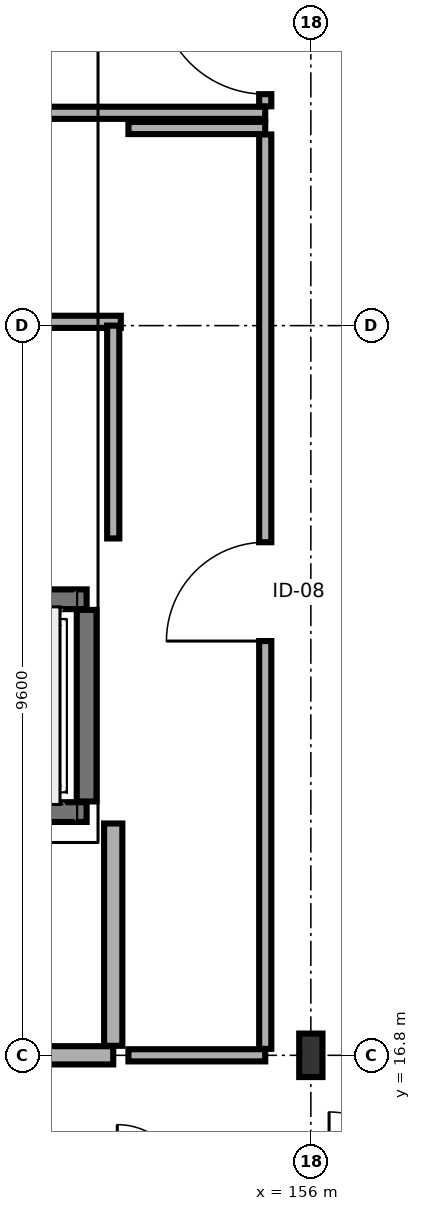
"""IFC4 building model, lengths in metres.
Left out: names, types, materials, properties, quantities, classifications, styles, units other than length and angle.
Written with IfcOpenShell. Run it as: python <this file> out.ifc"""

import sys

from ifc_helpers import new_model, si_unit, direction, frame, frame_2d, origin, origin_2d, place, context, subcontext, project, spatial, rectangle, i_section, extrude, element, fill, save


model = new_model("IFC4")
c1 = context("Model", 3, precision=1e-05, world=origin(), true_north=direction((0.0, 1.0)))
c2 = subcontext(c1, "Body", "Model", "MODEL_VIEW")
j1 = project(units=[si_unit("LENGTHUNIT", "METRE"), si_unit("PLANEANGLEUNIT", "RADIAN")], contexts=[c1])
p1 = place(None, origin())
s1 = spatial("IfcSite", under=j1, at=p1, CompositionType="ELEMENT")
p2 = place(p1, origin())
s2 = spatial("IfcBuilding", under=s1, at=p2, CompositionType="ELEMENT")
p3 = place(p2, frame((0.0, 0.0, 35.1)))
s3 = spatial("IfcBuildingStorey", under=s2, at=p3, CompositionType="ELEMENT", Elevation=35.1)
p4 = place(p3, frame((156.0, 16.8, 0.0), z_axis=(0.0, 0.0, 1.0), x_axis=(1.0, 0.0, 0.0)))
e1 = element("IfcColumn", 1, at=p4, inside=s3, PredefinedType="COLUMN", context=c2, shape_type="SweptSolid", body=[
    extrude(i_section(OverallWidth=0.306, OverallDepth=0.572, WebThickness=0.021, FlangeThickness=0.04, FilletRadius=0.027, at=origin_2d()), origin(), (0.0, 0.0, 1.0), 3.4),
])
p5 = place(p3, frame((150.55, 20.0, 0.0), z_axis=(0.0, 0.0, 1.0), x_axis=(1.0, 0.0, 0.0)))
e2 = element("IfcWall", 2, at=p5, inside=s3, PredefinedType="SHEAR", context=c2, shape_type="SweptSolid", body=[
    extrude(rectangle(XDim=2.5, YDim=0.26, at=frame_2d((1.25, 0.0))), origin(), (0.0, 0.0, 1.0), 3.165),
])
p6 = place(p5, frame((0.55, 0.0, 0.0)))
e3 = element("IfcOpeningElement", 3, at=p6, cuts=e2, PredefinedType="OPENING", context=c2, shape_type="SweptSolid", body=[
    extrude(rectangle(XDim=1.4, YDim=2.3, at=frame_2d((0.7, 1.15))), frame((0.0, 0.14, 0.0), z_axis=(0.0, -1.0, 0.0), x_axis=(1.0, 0.0, 0.0)), (0.0, 0.0, 1.0), 0.28),
])
p7 = place(p3, frame((150.55, 22.8, 0.0), z_axis=(0.0, 0.0, 1.0), x_axis=(1.0, 0.0, 0.0)))
e4 = element("IfcWall", 4, at=p7, inside=s3, PredefinedType="SHEAR", context=c2, shape_type="SweptSolid", body=[
    extrude(rectangle(XDim=2.5, YDim=0.26, at=frame_2d((1.25, 0.0))), origin(), (0.0, 0.0, 1.0), 3.165),
])
p8 = place(p3, frame((153.05, 20.14, 0.0), z_axis=(0.0, 0.0, 1.0), x_axis=(0.0, 1.0, 0.0)))
e5 = element("IfcWall", 5, at=p8, inside=s3, PredefinedType="SHEAR", context=c2, shape_type="SweptSolid", body=[
    extrude(rectangle(XDim=2.52, YDim=0.26, at=frame_2d((1.26, 0.0))), origin(), (0.0, 0.0, 1.0), 3.165),
])
p9 = place(p3, frame((146.4, 16.8, 0.0), z_axis=(0.0, 0.0, 1.0), x_axis=(1.0, 0.0, 0.0)))
e6 = element("IfcWall", 6, at=p9, inside=s3, PredefinedType="SOLIDWALL", context=c2, shape_type="SweptSolid", body=[
    extrude(rectangle(XDim=7.0, YDim=0.24, at=frame_2d((3.5, 0.0))), origin(), (0.0, 0.0, 1.0), 2.7),
])
p10 = place(p9, frame((2.7, 0.0, 0.0)))
e7 = element("IfcOpeningElement", 7, at=p10, cuts=e6, PredefinedType="OPENING", context=c2, shape_type="SweptSolid", body=[
    extrude(rectangle(XDim=1.6, YDim=2.2, at=frame_2d((0.8, 1.1))), frame((0.0, 0.13, 0.0), z_axis=(0.0, -1.0, 0.0), x_axis=(1.0, 0.0, 0.0)), (0.0, 0.0, 1.0), 0.26),
])
p11 = place(p3, frame((153.4, 16.925, 0.0), z_axis=(0.0, 0.0, 1.0), x_axis=(0.0, 1.0, 0.0)))
e8 = element("IfcWall", 8, at=p11, inside=s3, PredefinedType="SOLIDWALL", context=c2, shape_type="SweptSolid", body=[
    extrude(rectangle(XDim=2.925, YDim=0.24, at=frame_2d((1.462, 0.0))), origin(), (0.0, 0.0, 1.0), 2.7),
])
p12 = place(p3, frame((146.4, 29.2, 0.0), z_axis=(0.0, 0.0, 1.0), x_axis=(1.0, 0.0, 0.0)))
e9 = element("IfcWall", 9, at=p12, inside=s3, PredefinedType="PARTITIONING", context=c2, shape_type="SweptSolid", body=[
    extrude(rectangle(XDim=9.0, YDim=0.16, at=frame_2d((4.5, 0.0))), origin(), (0.0, 0.0, 1.0), 3.165),
])
p13 = place(p3, frame((155.4, 29.285, 0.0), z_axis=(0.0, 0.0, 1.0), x_axis=(0.0, 1.0, 0.0)))
e10 = element("IfcWall", 10, at=p13, inside=s3, PredefinedType="PARTITIONING", context=c2, shape_type="SweptSolid", body=[
    extrude(rectangle(XDim=9.03, YDim=0.16, at=frame_2d((4.515, 0.0))), origin(), (0.0, 0.0, 1.0), 3.165),
])
p14 = place(p13, frame((0.16, 0.0, 0.0)))
e11 = element("IfcOpeningElement", 11, at=p14, cuts=e10, PredefinedType="OPENING", context=c2, shape_type="SweptSolid", body=[
    extrude(rectangle(XDim=1.4, YDim=2.2, at=frame_2d((0.7, 1.1))), frame((0.0, 0.09, 0.0), z_axis=(0.0, -1.0, 0.0), x_axis=(1.0, 0.0, 0.0)), (0.0, 0.0, 1.0), 0.18),
])
p15 = place(p3, frame((153.6, 16.8, 0.0), z_axis=(0.0, 0.0, 1.0), x_axis=(1.0, 0.0, 0.0)))
e12 = element("IfcWall", 12, at=p15, inside=s3, PredefinedType="PARTITIONING", context=c2, shape_type="SweptSolid", body=[
    extrude(rectangle(XDim=1.8, YDim=0.16, at=frame_2d((0.9, 0.0))), origin(), (0.0, 0.0, 1.0), 2.7),
])
p16 = place(p3, frame((153.6, 29.0, 0.0), z_axis=(0.0, 0.0, 1.0), x_axis=(1.0, 0.0, 0.0)))
e13 = element("IfcWall", 13, at=p16, inside=s3, PredefinedType="PARTITIONING", context=c2, shape_type="SweptSolid", body=[
    extrude(rectangle(XDim=1.8, YDim=0.16, at=frame_2d((0.9, 0.0))), origin(), (0.0, 0.0, 1.0), 3.165),
])
p17 = place(p3, frame((155.4, 16.885, 0.0), z_axis=(0.0, 0.0, 1.0), x_axis=(0.0, 1.0, 0.0)))
e14 = element("IfcWall", 14, at=p17, inside=s3, PredefinedType="PARTITIONING", context=c2, shape_type="SweptSolid", body=[
    extrude(rectangle(XDim=12.03, YDim=0.16, at=frame_2d((6.015, 0.0))), origin(), (0.0, 0.0, 1.0), 2.7),
])
p18 = place(p17, frame((5.365, 0.0, 0.0)))
e15 = element("IfcOpeningElement", 15, at=p18, cuts=e14, PredefinedType="OPENING", context=c2, shape_type="SweptSolid", body=[
    extrude(rectangle(XDim=1.3, YDim=2.2, at=frame_2d((0.65, 1.1))), frame((0.0, 0.09, 0.0), z_axis=(0.0, -1.0, 0.0), x_axis=(1.0, 0.0, 0.0)), (0.0, 0.0, 1.0), 0.18),
])
p19 = place(p3, frame((152.35, 26.45, 0.0), z_axis=(0.0, 0.0, 1.0), x_axis=(1.0, 0.0, 0.0)))
e16 = element("IfcWall", 16, at=p19, inside=s3, PredefinedType="PARTITIONING", context=c2, shape_type="SweptSolid", body=[
    extrude(rectangle(XDim=1.15, YDim=0.16, at=frame_2d((0.575, 0.0))), origin(), (0.0, 0.0, 1.0), 3.165),
])
p20 = place(p3, frame((153.4, 23.6, 0.0), z_axis=(0.0, 0.0, 1.0), x_axis=(0.0, 1.0, 0.0)))
e17 = element("IfcWall", 17, at=p20, inside=s3, PredefinedType="PARTITIONING", context=c2, shape_type="SweptSolid", body=[
    extrude(rectangle(XDim=2.8, YDim=0.16, at=frame_2d((1.4, 0.0))), origin(), (0.0, 0.0, 1.0), 3.165),
])
p21 = place(p14, origin())
e18 = element("IfcDoor", 18, at=p21, inside=s3, OperationType="SINGLE_SWING_RIGHT", PredefinedType="DOOR", context=c2, shape_type="SweptSolid", body=[
    extrude(rectangle(XDim=1.4, YDim=2.2, at=frame_2d((0.7, 1.1))), frame((0.0, 0.025, 0.0), z_axis=(0.0, -1.0, 0.0), x_axis=(1.0, 0.0, 0.0)), (0.0, 0.0, 1.0), 0.05),
])
fill(e11, e18)
p22 = place(p18, origin())
e19 = element("IfcDoor", 19, at=p22, inside=s3, OperationType="SINGLE_SWING_LEFT", PredefinedType="DOOR", context=c2, shape_type="SweptSolid", body=[
    extrude(rectangle(XDim=1.3, YDim=2.2, at=frame_2d((0.65, 1.1))), frame((0.0, 0.025, 0.0), z_axis=(0.0, -1.0, 0.0), x_axis=(1.0, 0.0, 0.0)), (0.0, 0.0, 1.0), 0.05),
])
fill(e15, e19)
save(model, sys.argv[1])
